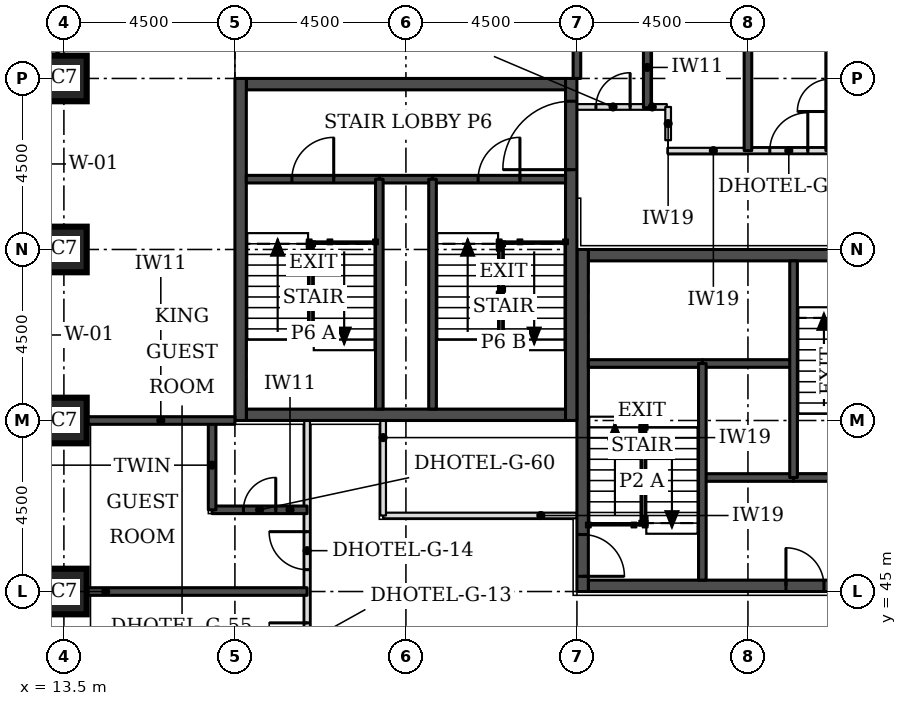
"""IFC4 building model, lengths in metres.
Left out: names, types, materials, properties, quantities, classifications, styles, units other than length and angle.
Written with IfcOpenShell. Run it as: python <this file> out.ifc"""

import sys

from ifc_helpers import new_model, si_unit, direction, frame, frame_2d, origin, origin_2d, place, context, subcontext, project, spatial, rectangle, extrude, element, fill, save


model = new_model("IFC4")
c1 = context("Model", 3, precision=1e-05, world=origin(), true_north=direction((0.0, 1.0)))
c2 = subcontext(c1, "Body", "Model", "MODEL_VIEW")
j1 = project(units=[si_unit("LENGTHUNIT", "METRE"), si_unit("PLANEANGLEUNIT", "RADIAN")], contexts=[c1])
p1 = place(None, origin())
s1 = spatial("IfcSite", under=j1, at=p1, CompositionType="ELEMENT")
p2 = place(p1, origin())
s2 = spatial("IfcBuilding", under=s1, at=p2, CompositionType="ELEMENT")
p3 = place(p2, frame((0.0, 0.0, 66.0)))
s3 = spatial("IfcBuildingStorey", under=s2, at=p3, CompositionType="ELEMENT", Elevation=66.0)
for number, where, z_axis, x_axis in (
    (1, (13.5, 45.0, 0.0), (0.0, 0.0, 1.0), (1.0, 0.0, 0.0)),
    (2, (13.5, 49.5, 0.0), (0.0, 0.0, 1.0), (1.0, 0.0, 0.0)),
    (3, (13.5, 54.0, 0.0), (0.0, 0.0, 1.0), (1.0, 0.0, 0.0)),
    (4, (13.5, 58.5, 0.0), (0.0, 0.0, 1.0), (1.0, 0.0, 0.0)),
):
    element("IfcColumn", number, at=place(p3, frame(where, z_axis=z_axis, x_axis=x_axis)), inside=s3, PredefinedType="COLUMN", context=c2, shape_type="SweptSolid", body=[
        extrude(rectangle(XDim=1.2, YDim=1.2, at=origin_2d()), origin(), (0.0, 0.0, 1.0), 3.3),
    ])
p4 = place(p3, frame((27.3, 45.15, 0.0), z_axis=(0.0, 0.0, 1.0), x_axis=(1.0, 0.0, 0.0)))
e5 = element("IfcWall", 5, at=p4, inside=s3, PredefinedType="SHEAR", context=c2, shape_type="SweptSolid", body=[
    extrude(rectangle(XDim=8.4, YDim=0.3, at=frame_2d((4.2, 0.0))), origin(), (0.0, 0.0, 1.0), 3.3),
])
p5 = place(p4, frame((5.2, 0.0, 0.0)))
e6 = element("IfcOpeningElement", 6, at=p5, cuts=e5, PredefinedType="OPENING", context=c2, shape_type="SweptSolid", body=[
    extrude(rectangle(XDim=1.0, YDim=2.1, at=frame_2d((0.5, 1.05))), frame((0.0, 0.16, 0.0), z_axis=(0.0, -1.0, 0.0), x_axis=(1.0, 0.0, 0.0)), (0.0, 0.0, 1.0), 0.32),
])
p6 = place(p3, frame((27.3, 53.85, 0.0), z_axis=(0.0, 0.0, 1.0), x_axis=(1.0, 0.0, 0.0)))
e7 = element("IfcWall", 7, at=p6, inside=s3, PredefinedType="SHEAR", context=c2, shape_type="SweptSolid", body=[
    extrude(rectangle(XDim=8.4, YDim=0.3, at=frame_2d((4.2, 0.0))), origin(), (0.0, 0.0, 1.0), 3.3),
])
p7 = place(p6, frame((6.4, 0.0, 0.0)))
e8 = element("IfcOpeningElement", 8, at=p7, cuts=e7, PredefinedType="OPENING", context=c2, shape_type="SweptSolid", body=[
    extrude(rectangle(XDim=1.1, YDim=2.1, at=frame_2d((0.55, 1.05))), frame((0.0, 0.16, 0.0), z_axis=(0.0, -1.0, 0.0), x_axis=(1.0, 0.0, 0.0)), (0.0, 0.0, 1.0), 0.32),
])
p8 = place(p3, frame((27.15, 45.0, 0.0), z_axis=(0.0, 0.0, 1.0), x_axis=(0.0, 1.0, 0.0)))
e9 = element("IfcWall", 9, at=p8, inside=s3, PredefinedType="SHEAR", context=c2, shape_type="SweptSolid", body=[
    extrude(rectangle(XDim=9.0, YDim=0.3, at=frame_2d((4.5, 0.0))), origin(), (0.0, 0.0, 1.0), 3.3),
])
p9 = place(p8, frame((0.4, 0.0, 0.0)))
e10 = element("IfcOpeningElement", 10, at=p9, cuts=e9, PredefinedType="OPENING", context=c2, shape_type="SweptSolid", body=[
    extrude(rectangle(XDim=1.1, YDim=2.1, at=frame_2d((0.55, 1.05))), frame((0.0, 0.16, 0.0), z_axis=(0.0, -1.0, 0.0), x_axis=(1.0, 0.0, 0.0)), (0.0, 0.0, 1.0), 0.32),
])
for number, where, z_axis, x_axis in (
    (11, (18.3, 49.65, 0.0), (0.0, 0.0, 1.0), (1.0, 0.0, 0.0)),
    (12, (18.3, 58.35, 0.0), (0.0, 0.0, 1.0), (1.0, 0.0, 0.0)),
):
    element("IfcWall", number, at=place(p3, frame(where, z_axis=z_axis, x_axis=x_axis)), inside=s3, PredefinedType="SHEAR", context=c2, shape_type="SweptSolid", body=[
        extrude(rectangle(XDim=8.4, YDim=0.3, at=frame_2d((4.2, 0.0))), origin(), (0.0, 0.0, 1.0), 3.3),
    ])
p10 = place(p3, frame((18.15, 49.5, 0.0), z_axis=(0.0, 0.0, 1.0), x_axis=(0.0, 1.0, 0.0)))
e13 = element("IfcWall", 13, at=p10, inside=s3, PredefinedType="SHEAR", context=c2, shape_type="SweptSolid", body=[
    extrude(rectangle(XDim=9.0, YDim=0.3, at=frame_2d((4.5, 0.0))), origin(), (0.0, 0.0, 1.0), 3.3),
])
p11 = place(p3, frame((26.85, 49.5, 0.0), z_axis=(0.0, 0.0, 1.0), x_axis=(0.0, 1.0, 0.0)))
e14 = element("IfcWall", 14, at=p11, inside=s3, PredefinedType="SHEAR", context=c2, shape_type="SweptSolid", body=[
    extrude(rectangle(XDim=9.0, YDim=0.3, at=frame_2d((4.5, 0.0))), origin(), (0.0, 0.0, 1.0), 3.3),
])
p12 = place(p11, frame((6.6, 0.0, 0.0)))
e15 = element("IfcOpeningElement", 15, at=p12, cuts=e14, PredefinedType="OPENING", context=c2, shape_type="SweptSolid", body=[
    extrude(rectangle(XDim=1.8, YDim=2.1, at=frame_2d((0.9, 1.05))), frame((0.0, 0.16, 0.0), z_axis=(0.0, -1.0, 0.0), x_axis=(1.0, 0.0, 0.0)), (0.0, 0.0, 1.0), 0.32),
])
p13 = place(p3, frame((17.73, 63.826, 0.0), z_axis=(0.0, 0.0, 1.0), x_axis=(-0.707106781187, -0.707106781187, 0.0)))
e16 = element("IfcWall", 16, at=p13, inside=s3, PredefinedType="STANDARD", context=c2, shape_type="SweptSolid", body=[
    extrude(rectangle(XDim=7.151, YDim=0.35, at=frame_2d((3.576, 0.0))), origin(), (0.0, 0.0, 1.0), 3.055),
])
p14 = place(p13, frame((1.926, 0.0, 0.8)))
e17 = element("IfcOpeningElement", 17, at=p14, cuts=e16, PredefinedType="OPENING", context=c2, shape_type="SweptSolid", body=[
    extrude(rectangle(XDim=3.3, YDim=1.5, at=frame_2d((1.65, 0.75))), frame((0.0, 0.185, 0.0), z_axis=(0.0, -1.0, 0.0), x_axis=(1.0, 0.0, 0.0)), (0.0, 0.0, 1.0), 0.37),
])
p15 = place(p3, frame((19.9, 24.4, 0.0), z_axis=(0.0, 0.0, 1.0), x_axis=(0.0, 1.0, 0.0)))
e18 = element("IfcWall", 18, at=p15, inside=s3, PredefinedType="PARTITIONING", context=c2, shape_type="SweptSolid", body=[
    extrude(rectangle(XDim=25.1, YDim=0.15, at=frame_2d((12.55, 0.0))), origin(), (0.0, 0.0, 1.0), 3.08),
])
p16 = place(p15, frame((0.775, 0.0, 0.0)))
e19 = element("IfcOpeningElement", 19, at=p16, cuts=e18, PredefinedType="OPENING", context=c2, shape_type="SweptSolid", body=[
    extrude(rectangle(XDim=1.0, YDim=2.1, at=frame_2d((0.5, 1.05))), frame((0.0, 0.085, 0.0), z_axis=(0.0, -1.0, 0.0), x_axis=(1.0, 0.0, 0.0)), (0.0, 0.0, 1.0), 0.17),
])
p17 = place(p15, frame((3.175, 0.0, 0.0)))
e20 = element("IfcOpeningElement", 20, at=p17, cuts=e18, PredefinedType="OPENING", context=c2, shape_type="SweptSolid", body=[
    extrude(rectangle(XDim=1.0, YDim=2.1, at=frame_2d((0.5, 1.05))), frame((0.0, 0.085, 0.0), z_axis=(0.0, -1.0, 0.0), x_axis=(1.0, 0.0, 0.0)), (0.0, 0.0, 1.0), 0.17),
])
p18 = place(p15, frame((9.775, 0.0, 0.0)))
e21 = element("IfcOpeningElement", 21, at=p18, cuts=e18, PredefinedType="OPENING", context=c2, shape_type="SweptSolid", body=[
    extrude(rectangle(XDim=1.0, YDim=2.1, at=frame_2d((0.5, 1.05))), frame((0.0, 0.085, 0.0), z_axis=(0.0, -1.0, 0.0), x_axis=(1.0, 0.0, 0.0)), (0.0, 0.0, 1.0), 0.17),
])
p19 = place(p15, frame((12.175, 0.0, 0.0)))
e22 = element("IfcOpeningElement", 22, at=p19, cuts=e18, PredefinedType="OPENING", context=c2, shape_type="SweptSolid", body=[
    extrude(rectangle(XDim=1.0, YDim=2.1, at=frame_2d((0.5, 1.05))), frame((0.0, 0.085, 0.0), z_axis=(0.0, -1.0, 0.0), x_axis=(1.0, 0.0, 0.0)), (0.0, 0.0, 1.0), 0.17),
])
p20 = place(p15, frame((18.775, 0.0, 0.0)))
e23 = element("IfcOpeningElement", 23, at=p20, cuts=e18, PredefinedType="OPENING", context=c2, shape_type="SweptSolid", body=[
    extrude(rectangle(XDim=1.0, YDim=2.1, at=frame_2d((0.5, 1.05))), frame((0.0, 0.085, 0.0), z_axis=(0.0, -1.0, 0.0), x_axis=(1.0, 0.0, 0.0)), (0.0, 0.0, 1.0), 0.17),
])
p21 = place(p15, frame((21.175, 0.0, 0.0)))
e24 = element("IfcOpeningElement", 24, at=p21, cuts=e18, PredefinedType="OPENING", context=c2, shape_type="SweptSolid", body=[
    extrude(rectangle(XDim=1.0, YDim=2.1, at=frame_2d((0.5, 1.05))), frame((0.0, 0.085, 0.0), z_axis=(0.0, -1.0, 0.0), x_axis=(1.0, 0.0, 0.0)), (0.0, 0.0, 1.0), 0.17),
])
p22 = place(p3, frame((21.9, 47.0, 0.0), z_axis=(0.0, 0.0, 1.0), x_axis=(1.0, 0.0, 0.0)))
e25 = element("IfcWall", 25, at=p22, inside=s3, PredefinedType="PARTITIONING", context=c2, shape_type="SweptSolid", body=[
    extrude(rectangle(XDim=5.1, YDim=0.15, at=frame_2d((2.55, 0.0))), origin(), (0.0, 0.0, 1.0), 3.08),
])
p23 = place(p3, frame((21.9, 47.0, 0.0), z_axis=(0.0, 0.0, 1.0), x_axis=(0.0, 1.0, 0.0)))
e26 = element("IfcWall", 26, at=p23, inside=s3, PredefinedType="PARTITIONING", context=c2, shape_type="SweptSolid", body=[
    extrude(rectangle(XDim=2.5, YDim=0.15, at=frame_2d((1.25, 0.0))), origin(), (0.0, 0.0, 1.0), 3.08),
])
p24 = place(p3, frame((29.38, 56.6, 0.0), z_axis=(0.0, 0.0, 1.0), x_axis=(1.0, 0.0, 0.0)))
e27 = element("IfcWall", 27, at=p24, inside=s3, PredefinedType="PARTITIONING", context=c2, shape_type="SweptSolid", body=[
    extrude(rectangle(XDim=13.62, YDim=0.15, at=frame_2d((6.81, 0.0))), origin(), (0.0, 0.0, 1.0), 3.08),
])
p25 = place(p24, frame((2.695, 0.0, 0.0)))
e28 = element("IfcOpeningElement", 28, at=p25, cuts=e27, PredefinedType="OPENING", context=c2, shape_type="SweptSolid", body=[
    extrude(rectangle(XDim=1.0, YDim=2.1, at=frame_2d((0.5, 1.05))), frame((0.0, 0.085, 0.0), z_axis=(0.0, -1.0, 0.0), x_axis=(1.0, 0.0, 0.0)), (0.0, 0.0, 1.0), 0.17),
])
p26 = place(p24, frame((9.67, 0.0, 0.0)))
e29 = element("IfcOpeningElement", 29, at=p26, cuts=e27, PredefinedType="OPENING", context=c2, shape_type="SweptSolid", body=[
    extrude(rectangle(XDim=0.9, YDim=2.1, at=frame_2d((0.45, 1.05))), frame((0.0, 0.085, 0.0), z_axis=(0.0, -1.0, 0.0), x_axis=(1.0, 0.0, 0.0)), (0.0, 0.0, 1.0), 0.17),
])
p27 = place(p3, frame((14.1, 45.0, 0.0), z_axis=(0.0, 0.0, 1.0), x_axis=(1.0, 0.0, 0.0)))
e30 = element("IfcWall", 30, at=p27, inside=s3, PredefinedType="SOLIDWALL", context=c2, shape_type="SweptSolid", body=[
    extrude(rectangle(XDim=5.8, YDim=0.2, at=frame_2d((2.9, 0.0))), origin(), (0.0, 0.0, 1.0), 3.08),
])
p28 = place(p3, frame((17.4, 47.15, 0.0), z_axis=(0.0, 0.0, 1.0), x_axis=(1.0, 0.0, 0.0)))
e31 = element("IfcWall", 31, at=p28, inside=s3, PredefinedType="SOLIDWALL", context=c2, shape_type="SweptSolid", body=[
    extrude(rectangle(XDim=2.5, YDim=0.2, at=frame_2d((1.25, 0.0))), origin(), (0.0, 0.0, 1.0), 3.08),
])
p29 = place(p28, frame((0.825, 0.0, 0.0)))
e32 = element("IfcOpeningElement", 32, at=p29, cuts=e31, PredefinedType="OPENING", context=c2, shape_type="SweptSolid", body=[
    extrude(rectangle(XDim=0.85, YDim=2.1, at=frame_2d((0.425, 1.05))), frame((0.0, 0.11, 0.0), z_axis=(0.0, -1.0, 0.0), x_axis=(1.0, 0.0, 0.0)), (0.0, 0.0, 1.0), 0.22),
])
p30 = place(p3, frame((17.4, 47.15, 0.0), z_axis=(0.0, 0.0, 1.0), x_axis=(0.0, 1.0, 0.0)))
e33 = element("IfcWall", 33, at=p30, inside=s3, PredefinedType="SOLIDWALL", context=c2, shape_type="SweptSolid", body=[
    extrude(rectangle(XDim=2.35, YDim=0.2, at=frame_2d((1.175, 0.0))), origin(), (0.0, 0.0, 1.0), 3.08),
])
for number, where, z_axis, x_axis in (
    (34, (14.1, 49.5, 0.0), (0.0, 0.0, 1.0), (1.0, 0.0, 0.0)),
    (35, (27.0, 58.5, 0.0), (0.0, 0.0, 1.0), (0.0, 1.0, 0.0)),
):
    element("IfcWall", number, at=place(p3, frame(where, z_axis=z_axis, x_axis=x_axis)), inside=s3, PredefinedType="SOLIDWALL", context=c2, shape_type="SweptSolid", body=[
        extrude(rectangle(XDim=3.9, YDim=0.2, at=frame_2d((1.95, 0.0))), origin(), (0.0, 0.0, 1.0), 3.08),
    ])
p31 = place(p3, frame((28.85, 57.73, 0.0), z_axis=(0.0, 0.0, 1.0), x_axis=(0.0, 1.0, 0.0)))
e36 = element("IfcWall", 36, at=p31, inside=s3, PredefinedType="SOLIDWALL", context=c2, shape_type="SweptSolid", body=[
    extrude(rectangle(XDim=2.12, YDim=0.2, at=frame_2d((1.06, 0.0))), origin(), (0.0, 0.0, 1.0), 3.08),
])
p32 = place(p3, frame((31.5, 56.6, 0.0), z_axis=(0.0, 0.0, 1.0), x_axis=(0.0, 1.0, 0.0)))
e37 = element("IfcWall", 37, at=p32, inside=s3, PredefinedType="SOLIDWALL", context=c2, shape_type="SweptSolid", body=[
    extrude(rectangle(XDim=5.8, YDim=0.2, at=frame_2d((2.9, 0.0))), origin(), (0.0, 0.0, 1.0), 3.08),
])
p33 = place(p3, frame((33.65, 56.6, 0.0), z_axis=(0.0, 0.0, 1.0), x_axis=(0.0, 1.0, 0.0)))
e38 = element("IfcWall", 38, at=p33, inside=s3, PredefinedType="SOLIDWALL", context=c2, shape_type="SweptSolid", body=[
    extrude(rectangle(XDim=3.25, YDim=0.2, at=frame_2d((1.625, 0.0))), origin(), (0.0, 0.0, 1.0), 3.08),
])
p34 = place(p33, frame((1.03, 0.0, 0.0)))
e39 = element("IfcOpeningElement", 39, at=p34, cuts=e38, PredefinedType="OPENING", context=c2, shape_type="SweptSolid", body=[
    extrude(rectangle(XDim=0.85, YDim=2.1, at=frame_2d((0.425, 1.05))), frame((0.0, 0.11, 0.0), z_axis=(0.0, -1.0, 0.0), x_axis=(1.0, 0.0, 0.0)), (0.0, 0.0, 1.0), 0.22),
])
p35 = place(p3, frame((27.0, 57.75, 0.0), z_axis=(0.0, 0.0, 1.0), x_axis=(1.0, 0.0, 0.0)))
e40 = element("IfcWall", 40, at=p35, inside=s3, PredefinedType="PARTITIONING", context=c2, shape_type="SweptSolid", body=[
    extrude(rectangle(XDim=2.365, YDim=0.15, at=frame_2d((1.183, 0.0))), origin(), (0.0, 0.0, 1.0), 3.08),
])
p36 = place(p35, frame((0.5, 0.0, 0.0)))
e41 = element("IfcOpeningElement", 41, at=p36, cuts=e40, PredefinedType="OPENING", context=c2, shape_type="SweptSolid", body=[
    extrude(rectangle(XDim=0.9, YDim=2.1, at=frame_2d((0.45, 1.05))), frame((0.0, 0.085, 0.0), z_axis=(0.0, -1.0, 0.0), x_axis=(1.0, 0.0, 0.0)), (0.0, 0.0, 1.0), 0.17),
])
p37 = place(p3, frame((29.4, 57.75, 0.0), z_axis=(0.0, 0.0, 1.0), x_axis=(0.0, -1.0, 0.0)))
e42 = element("IfcWall", 42, at=p37, inside=s3, PredefinedType="PARTITIONING", context=c2, shape_type="SweptSolid", body=[
    extrude(rectangle(XDim=0.875, YDim=0.15, at=frame_2d((0.438, 0.0))), origin(), (0.0, 0.0, 1.0), 3.08),
])
p38 = place(p3, frame((30.3, 48.0, 0.0), z_axis=(0.0, 0.0, 1.0), x_axis=(1.0, 0.0, 0.0)))
e43 = element("IfcWall", 43, at=p38, inside=s3, PredefinedType="SOLIDWALL", context=c2, shape_type="SweptSolid", body=[
    extrude(rectangle(XDim=2.4, YDim=0.2, at=frame_2d((1.2, 0.0))), origin(), (0.0, 0.0, 1.0), 3.08),
])
p39 = place(p3, frame((32.7, 48.0, 0.0), z_axis=(0.0, 0.0, 1.0), x_axis=(1.0, 0.0, 0.0)))
e44 = element("IfcWall", 44, at=p39, inside=s3, PredefinedType="SOLIDWALL", context=c2, shape_type="SweptSolid", body=[
    extrude(rectangle(XDim=3.0, YDim=0.2, at=frame_2d((1.5, 0.0))), origin(), (0.0, 0.0, 1.0), 3.08),
])
p40 = place(p3, frame((30.3, 51.0, 0.0), z_axis=(0.0, 0.0, 1.0), x_axis=(1.0, 0.0, 0.0)))
e45 = element("IfcWall", 45, at=p40, inside=s3, PredefinedType="SOLIDWALL", context=c2, shape_type="SweptSolid", body=[
    extrude(rectangle(XDim=2.4, YDim=0.2, at=frame_2d((1.2, 0.0))), origin(), (0.0, 0.0, 1.0), 3.3),
])
p41 = place(p3, frame((27.3, 51.0, 0.0), z_axis=(0.0, 0.0, 1.0), x_axis=(1.0, 0.0, 0.0)))
e46 = element("IfcWall", 46, at=p41, inside=s3, PredefinedType="SOLIDWALL", context=c2, shape_type="SweptSolid", body=[
    extrude(rectangle(XDim=3.0, YDim=0.2, at=frame_2d((1.5, 0.0))), origin(), (0.0, 0.0, 1.0), 3.08),
])
for number, where, z_axis, x_axis in (
    (47, (30.3, 45.3, 0.0), (0.0, 0.0, 1.0), (0.0, 1.0, 0.0)),
    (48, (32.7, 48.0, 0.0), (0.0, 0.0, 1.0), (0.0, 1.0, 0.0)),
):
    element("IfcWall", number, at=place(p3, frame(where, z_axis=z_axis, x_axis=x_axis)), inside=s3, PredefinedType="SOLIDWALL", context=c2, shape_type="SweptSolid", body=[
        extrude(rectangle(XDim=5.7, YDim=0.2, at=frame_2d((2.85, 0.0))), origin(), (0.0, 0.0, 1.0), 3.08),
    ])
p42 = place(p3, frame((21.8, 55.85, 0.0), z_axis=(0.0, 0.0, 1.0), x_axis=(1.0, 0.0, 0.0)))
e49 = element("IfcWall", 49, at=p42, inside=s3, PredefinedType="SOLIDWALL", context=c2, shape_type="SweptSolid", body=[
    extrude(rectangle(XDim=1.4, YDim=0.2, at=frame_2d((0.7, 0.0))), origin(), (0.0, 0.0, 1.0), 3.08),
])
p43 = place(p3, frame((18.3, 55.85, 0.0), z_axis=(0.0, 0.0, 1.0), x_axis=(1.0, 0.0, 0.0)))
e50 = element("IfcWall", 50, at=p43, inside=s3, PredefinedType="SOLIDWALL", context=c2, shape_type="SweptSolid", body=[
    extrude(rectangle(XDim=3.5, YDim=0.2, at=frame_2d((1.75, 0.0))), origin(), (0.0, 0.0, 1.0), 3.08),
])
p44 = place(p43, frame((1.2, 0.0, 0.0)))
e51 = element("IfcOpeningElement", 51, at=p44, cuts=e50, PredefinedType="OPENING", context=c2, shape_type="SweptSolid", body=[
    extrude(rectangle(XDim=1.1, YDim=2.1, at=frame_2d((0.55, 1.05))), frame((0.0, 0.11, 0.0), z_axis=(0.0, -1.0, 0.0), x_axis=(1.0, 0.0, 0.0)), (0.0, 0.0, 1.0), 0.22),
])
p45 = place(p3, frame((23.2, 55.85, 0.0), z_axis=(0.0, 0.0, 1.0), x_axis=(1.0, 0.0, 0.0)))
e52 = element("IfcWall", 52, at=p45, inside=s3, PredefinedType="SOLIDWALL", context=c2, shape_type="SweptSolid", body=[
    extrude(rectangle(XDim=3.5, YDim=0.2, at=frame_2d((1.75, 0.0))), origin(), (0.0, 0.0, 1.0), 3.08),
])
p46 = place(p45, frame((1.2, 0.0, 0.0)))
e53 = element("IfcOpeningElement", 53, at=p46, cuts=e52, PredefinedType="OPENING", context=c2, shape_type="SweptSolid", body=[
    extrude(rectangle(XDim=1.1, YDim=2.1, at=frame_2d((0.55, 1.05))), frame((0.0, 0.11, 0.0), z_axis=(0.0, -1.0, 0.0), x_axis=(1.0, 0.0, 0.0)), (0.0, 0.0, 1.0), 0.22),
])
for number, where, z_axis, x_axis in (
    (54, (21.8, 49.8, 0.0), (0.0, 0.0, 1.0), (0.0, 1.0, 0.0)),
    (55, (23.2, 49.8, 0.0), (0.0, 0.0, 1.0), (0.0, 1.0, 0.0)),
):
    element("IfcWall", number, at=place(p3, frame(where, z_axis=z_axis, x_axis=x_axis)), inside=s3, PredefinedType="SOLIDWALL", context=c2, shape_type="SweptSolid", body=[
        extrude(rectangle(XDim=6.05, YDim=0.2, at=frame_2d((3.025, 0.0))), origin(), (0.0, 0.0, 1.0), 3.08),
    ])
p47 = place(p20, origin())
e56 = element("IfcDoor", 56, at=p47, inside=s3, OperationType="SINGLE_SWING_RIGHT", PredefinedType="DOOR", context=c2, shape_type="SweptSolid", body=[
    extrude(rectangle(XDim=1.0, YDim=2.1, at=frame_2d((0.5, 1.05))), frame((0.0, 0.025, 0.0), z_axis=(0.0, -1.0, 0.0), x_axis=(1.0, 0.0, 0.0)), (0.0, 0.0, 1.0), 0.05),
])
fill(e23, e56)
p48 = place(p21, origin())
e57 = element("IfcDoor", 57, at=p48, inside=s3, OperationType="SINGLE_SWING_RIGHT", PredefinedType="DOOR", context=c2, shape_type="SweptSolid", body=[
    extrude(rectangle(XDim=1.0, YDim=2.1, at=frame_2d((0.5, 1.05))), frame((0.0, 0.025, 0.0), z_axis=(0.0, -1.0, 0.0), x_axis=(1.0, 0.0, 0.0)), (0.0, 0.0, 1.0), 0.05),
])
fill(e24, e57)
p49 = place(p29, origin())
e58 = element("IfcDoor", 58, at=p49, inside=s3, OperationType="SINGLE_SWING_RIGHT", PredefinedType="DOOR", context=c2, shape_type="SweptSolid", body=[
    extrude(rectangle(XDim=0.85, YDim=2.1, at=frame_2d((0.425, 1.05))), frame((0.0, 0.025, 0.0), z_axis=(0.0, -1.0, 0.0), x_axis=(1.0, 0.0, 0.0)), (0.0, 0.0, 1.0), 0.05),
])
fill(e32, e58)
p50 = place(p25, origin())
e59 = element("IfcDoor", 59, at=p50, inside=s3, OperationType="SINGLE_SWING_RIGHT", PredefinedType="DOOR", context=c2, shape_type="SweptSolid", body=[
    extrude(rectangle(XDim=1.0, YDim=2.1, at=frame_2d((0.5, 1.05))), frame((0.0, 0.025, 0.0), z_axis=(0.0, -1.0, 0.0), x_axis=(1.0, 0.0, 0.0)), (0.0, 0.0, 1.0), 0.05),
])
fill(e28, e59)
p51 = place(p36, origin())
e60 = element("IfcDoor", 60, at=p51, inside=s3, OperationType="SINGLE_SWING_RIGHT", PredefinedType="DOOR", context=c2, shape_type="SweptSolid", body=[
    extrude(rectangle(XDim=0.9, YDim=2.1, at=frame_2d((0.45, 1.05))), frame((0.0, 0.025, 0.0), z_axis=(0.0, -1.0, 0.0), x_axis=(1.0, 0.0, 0.0)), (0.0, 0.0, 1.0), 0.05),
])
fill(e41, e60)
p52 = place(p9, frame((1.1, 0.0, 0.0), z_axis=(0.0, 0.0, 1.0), x_axis=(-1.0, 0.0, 0.0)))
e61 = element("IfcDoor", 61, at=p52, inside=s3, OperationType="SINGLE_SWING_RIGHT", PredefinedType="DOOR", context=c2, shape_type="SweptSolid", body=[
    extrude(rectangle(XDim=1.1, YDim=2.1, at=frame_2d((0.55, 1.05))), frame((0.0, 0.025, 0.0), z_axis=(0.0, -1.0, 0.0), x_axis=(1.0, 0.0, 0.0)), (0.0, 0.0, 1.0), 0.05),
])
fill(e10, e61)
p53 = place(p5, origin())
e62 = element("IfcDoor", 62, at=p53, inside=s3, OperationType="SINGLE_SWING_LEFT", PredefinedType="DOOR", context=c2, shape_type="SweptSolid", body=[
    extrude(rectangle(XDim=1.0, YDim=2.1, at=frame_2d((0.5, 1.05))), frame((0.0, 0.025, 0.0), z_axis=(0.0, -1.0, 0.0), x_axis=(1.0, 0.0, 0.0)), (0.0, 0.0, 1.0), 0.05),
])
fill(e6, e62)
p54 = place(p44, origin())
e63 = element("IfcDoor", 63, at=p54, inside=s3, OperationType="SINGLE_SWING_RIGHT", PredefinedType="DOOR", context=c2, shape_type="SweptSolid", body=[
    extrude(rectangle(XDim=1.1, YDim=2.1, at=frame_2d((0.55, 1.05))), frame((0.0, 0.025, 0.0), z_axis=(0.0, -1.0, 0.0), x_axis=(1.0, 0.0, 0.0)), (0.0, 0.0, 1.0), 0.05),
])
fill(e51, e63)
p55 = place(p46, origin())
e64 = element("IfcDoor", 64, at=p55, inside=s3, OperationType="SINGLE_SWING_RIGHT", PredefinedType="DOOR", context=c2, shape_type="SweptSolid", body=[
    extrude(rectangle(XDim=1.1, YDim=2.1, at=frame_2d((0.55, 1.05))), frame((0.0, 0.025, 0.0), z_axis=(0.0, -1.0, 0.0), x_axis=(1.0, 0.0, 0.0)), (0.0, 0.0, 1.0), 0.05),
])
fill(e53, e64)
p56 = place(p12, origin())
e65 = element("IfcDoor", 65, at=p56, inside=s3, OperationType="SINGLE_SWING_LEFT", PredefinedType="DOOR", context=c2, shape_type="SweptSolid", body=[
    extrude(rectangle(XDim=1.8, YDim=2.1, at=frame_2d((0.9, 1.05))), frame((0.0, 0.025, 0.0), z_axis=(0.0, -1.0, 0.0), x_axis=(1.0, 0.0, 0.0)), (0.0, 0.0, 1.0), 0.05),
])
fill(e15, e65)
save(model, sys.argv[1])
